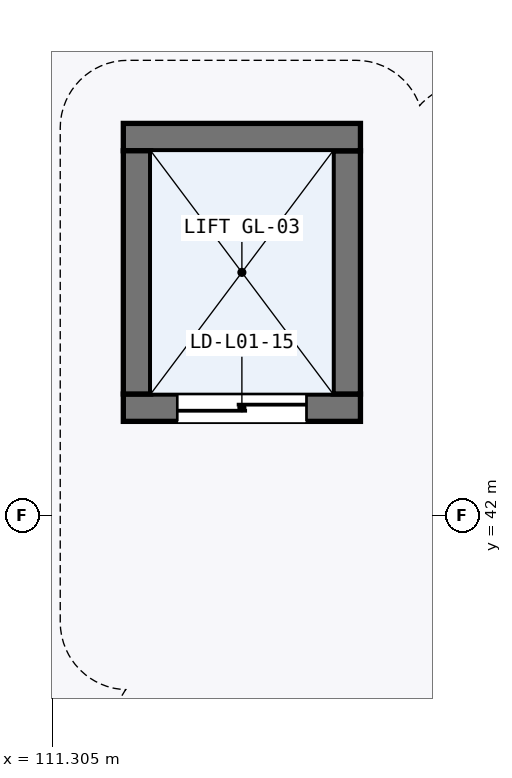
"""IFC4 building model, lengths in metres.
Left out: names, types, materials, properties, quantities, classifications, styles, units other than length and angle.
Written with IfcOpenShell. Run it as: python <this file> out.ifc"""

import sys

from ifc_helpers import new_model, si_unit, direction, frame, frame_2d, origin, place, context, subcontext, project, spatial, rectangle, extrude, element, fill, save


model = new_model("IFC4")
c1 = context("Model", 3, precision=1e-05, world=origin(), true_north=direction((0.0, 1.0)))
c2 = subcontext(c1, "Body", "Model", "MODEL_VIEW")
j1 = project(units=[si_unit("LENGTHUNIT", "METRE"), si_unit("PLANEANGLEUNIT", "RADIAN")], contexts=[c1])
p1 = place(None, origin())
s1 = spatial("IfcSite", under=j1, at=p1, CompositionType="ELEMENT")
p2 = place(p1, origin())
s2 = spatial("IfcBuilding", under=s1, at=p2, CompositionType="ELEMENT")
p3 = place(p2, origin())
s3 = spatial("IfcBuildingStorey", under=s2, at=p3, CompositionType="ELEMENT", Elevation=0.0)
p4 = place(p3, frame((112.24, 43.42, 0.0), z_axis=(0.0, 0.0, 1.0), x_axis=(1.0, 0.0, 0.0)))
e1 = element("IfcWall", 1, at=p4, inside=s3, PredefinedType="SHEAR", context=c2, shape_type="SweptSolid", body=[
    extrude(rectangle(XDim=3.12, YDim=0.36, at=frame_2d((1.56, 0.0))), origin(), (0.0, 0.0, 1.0), 5.745),
])
p5 = place(p4, frame((0.71, 0.0, 0.0)))
e2 = element("IfcOpeningElement", 2, at=p5, cuts=e1, PredefinedType="OPENING", context=c2, shape_type="SweptSolid", body=[
    extrude(rectangle(XDim=1.7, YDim=2.3, at=frame_2d((0.85, 1.15))), frame((0.0, 0.19, 0.0), z_axis=(0.0, -1.0, 0.0), x_axis=(1.0, 0.0, 0.0)), (0.0, 0.0, 1.0), 0.38),
])
p6 = place(p3, frame((115.18, 43.6, 0.0), z_axis=(0.0, 0.0, 1.0), x_axis=(0.0, 1.0, 0.0)))
e3 = element("IfcWall", 3, at=p6, inside=s3, PredefinedType="SHEAR", context=c2, shape_type="SweptSolid", body=[
    extrude(rectangle(XDim=3.2, YDim=0.36, at=frame_2d((1.6, 0.0))), origin(), (0.0, 0.0, 1.0), 5.745),
])
p7 = place(p3, frame((115.36, 46.98, 0.0), z_axis=(0.0, 0.0, 1.0), x_axis=(-1.0, 0.0, 0.0)))
e4 = element("IfcWall", 4, at=p7, inside=s3, PredefinedType="SHEAR", context=c2, shape_type="SweptSolid", body=[
    extrude(rectangle(XDim=3.12, YDim=0.36, at=frame_2d((1.56, 0.0))), origin(), (0.0, 0.0, 1.0), 5.745),
])
p8 = place(p3, frame((112.42, 46.8, 0.0), z_axis=(0.0, 0.0, 1.0), x_axis=(0.0, -1.0, 0.0)))
e5 = element("IfcWall", 5, at=p8, inside=s3, PredefinedType="SHEAR", context=c2, shape_type="SweptSolid", body=[
    extrude(rectangle(XDim=3.2, YDim=0.36, at=frame_2d((1.6, 0.0))), origin(), (0.0, 0.0, 1.0), 5.745),
])
p9 = place(p5, frame((1.7, 0.0, 0.0), z_axis=(0.0, 0.0, 1.0), x_axis=(-1.0, 0.0, 0.0)))
e6 = element("IfcDoor", 6, at=p9, inside=s3, OperationType="DOUBLE_DOOR_SLIDING", PredefinedType="DOOR", context=c2, shape_type="SweptSolid", body=[
    extrude(rectangle(XDim=1.7, YDim=2.3, at=frame_2d((0.85, 1.15))), frame((0.0, 0.025, 0.0), z_axis=(0.0, -1.0, 0.0), x_axis=(1.0, 0.0, 0.0)), (0.0, 0.0, 1.0), 0.05),
])
fill(e2, e6)
save(model, sys.argv[1])
